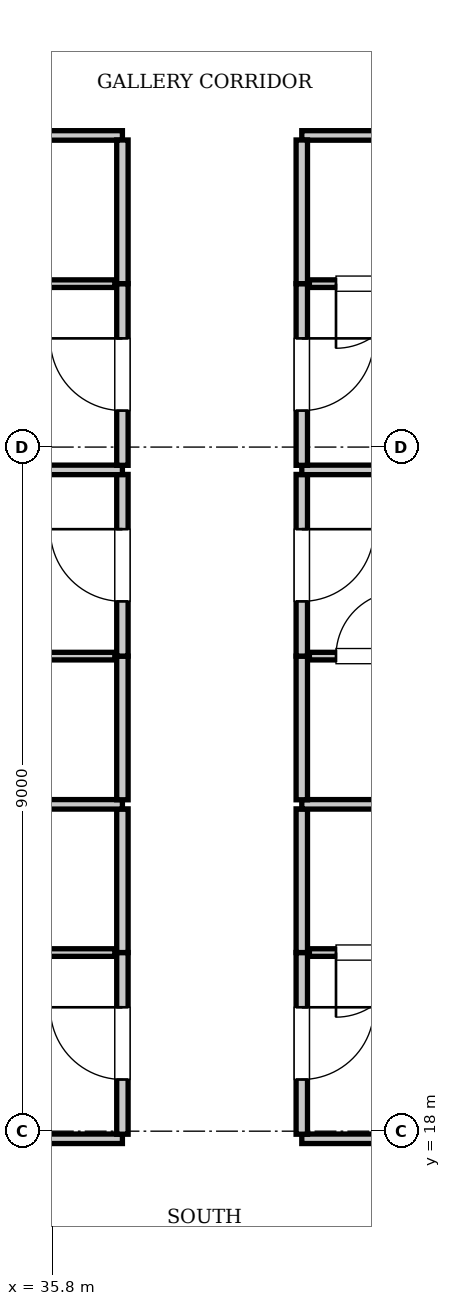
"""IFC4 building model, lengths in metres.
Left out: names, types, materials, properties, quantities, classifications, styles, units other than length and angle.
Written with IfcOpenShell. Run it as: python <this file> out.ifc"""

import sys

from ifc_helpers import new_model, si_unit, direction, frame, frame_2d, origin, place, context, subcontext, project, spatial, rectangle, extrude, element, fill, save


model = new_model("IFC4")
c1 = context("Model", 3, precision=1e-05, world=origin(), true_north=direction((0.0, 1.0)))
c2 = subcontext(c1, "Body", "Model", "MODEL_VIEW")
j1 = project(units=[si_unit("LENGTHUNIT", "METRE"), si_unit("PLANEANGLEUNIT", "RADIAN")], contexts=[c1])
p1 = place(None, origin())
s1 = spatial("IfcSite", under=j1, at=p1, CompositionType="ELEMENT")
p2 = place(p1, origin())
s2 = spatial("IfcBuilding", under=s1, at=p2, CompositionType="ELEMENT")
p3 = place(p2, frame((0.0, 0.0, 215.95)))
s3 = spatial("IfcBuildingStorey", under=s2, at=p3, CompositionType="ELEMENT", Elevation=215.95)
p4 = place(p3, frame((13.2, 17.9, 0.0), z_axis=(0.0, 0.0, 1.0), x_axis=(1.0, 0.0, 0.0)))
e1 = element("IfcWall", 1, at=p4, inside=s3, PredefinedType="PARTITIONING", context=c2, shape_type="SweptSolid", body=[
    extrude(rectangle(XDim=23.52, YDim=0.125, at=frame_2d((11.76, 0.0))), origin(), (0.0, 0.0, 1.0), 3.071),
])
p5 = place(p3, frame((39.08, 17.9, 0.0), z_axis=(0.0, 0.0, 1.0), x_axis=(1.0, 0.0, 0.0)))
e2 = element("IfcWall", 2, at=p5, inside=s3, PredefinedType="PARTITIONING", context=c2, shape_type="SweptSolid", body=[
    extrude(rectangle(XDim=23.32, YDim=0.125, at=frame_2d((11.66, 0.0))), origin(), (0.0, 0.0, 1.0), 3.071),
])
p6 = place(p3, frame((13.2, 31.1, 0.0), z_axis=(0.0, 0.0, 1.0), x_axis=(1.0, 0.0, 0.0)))
e3 = element("IfcWall", 3, at=p6, inside=s3, PredefinedType="PARTITIONING", context=c2, shape_type="SweptSolid", body=[
    extrude(rectangle(XDim=23.52, YDim=0.125, at=frame_2d((11.76, 0.0))), origin(), (0.0, 0.0, 1.0), 3.61),
])
p7 = place(p3, frame((39.08, 31.1, 0.0), z_axis=(0.0, 0.0, 1.0), x_axis=(1.0, 0.0, 0.0)))
e4 = element("IfcWall", 4, at=p7, inside=s3, PredefinedType="PARTITIONING", context=c2, shape_type="SweptSolid", body=[
    extrude(rectangle(XDim=23.32, YDim=0.125, at=frame_2d((11.66, 0.0))), origin(), (0.0, 0.0, 1.0), 3.61),
])
p8 = place(p3, frame((36.72, 17.96, 0.0), z_axis=(0.0, 0.0, 1.0), x_axis=(0.0, 1.0, 0.0)))
e5 = element("IfcWall", 5, at=p8, inside=s3, PredefinedType="PARTITIONING", context=c2, shape_type="SweptSolid", body=[
    extrude(rectangle(XDim=2.39, YDim=0.15, at=frame_2d((1.195, 0.0))), origin(), (0.0, 0.0, 1.0), 3.61),
])
p9 = place(p8, frame((0.72, 0.0, 0.0)))
e6 = element("IfcOpeningElement", 6, at=p9, cuts=e5, PredefinedType="OPENING", context=c2, shape_type="SweptSolid", body=[
    extrude(rectangle(XDim=0.95, YDim=2.15, at=frame_2d((0.475, 1.075))), frame((0.0, 0.085, 0.0), z_axis=(0.0, -1.0, 0.0), x_axis=(1.0, 0.0, 0.0)), (0.0, 0.0, 1.0), 0.17),
])
p10 = place(p3, frame((36.72, 20.35, 0.0), z_axis=(0.0, 0.0, 1.0), x_axis=(0.0, 1.0, 0.0)))
e7 = element("IfcWall", 7, at=p10, inside=s3, PredefinedType="PARTITIONING", context=c2, shape_type="SweptSolid", body=[
    extrude(rectangle(XDim=1.89, YDim=0.15, at=frame_2d((0.945, 0.0))), origin(), (0.0, 0.0, 1.0), 3.61),
])
p11 = place(p3, frame((34.32, 20.35, 0.0), z_axis=(0.0, 0.0, 1.0), x_axis=(1.0, 0.0, 0.0)))
e8 = element("IfcWall", 8, at=p11, inside=s3, PredefinedType="PARTITIONING", context=c2, shape_type="SweptSolid", body=[
    extrude(rectangle(XDim=2.3, YDim=0.1, at=frame_2d((1.15, 0.0))), origin(), (0.0, 0.0, 1.0), 3.61),
])
p12 = place(p11, frame((0.35, 0.0, 0.0)))
e9 = element("IfcOpeningElement", 9, at=p12, cuts=e8, PredefinedType="OPENING", context=c2, shape_type="SweptSolid", body=[
    extrude(rectangle(XDim=0.85, YDim=2.1, at=frame_2d((0.425, 1.05))), frame((0.0, 0.06, 0.0), z_axis=(0.0, -1.0, 0.0), x_axis=(1.0, 0.0, 0.0)), (0.0, 0.0, 1.0), 0.12),
])
p13 = place(p3, frame((39.08, 17.96, 0.0), z_axis=(0.0, 0.0, 1.0), x_axis=(0.0, 1.0, 0.0)))
e10 = element("IfcWall", 10, at=p13, inside=s3, PredefinedType="PARTITIONING", context=c2, shape_type="SweptSolid", body=[
    extrude(rectangle(XDim=2.39, YDim=0.15, at=frame_2d((1.195, 0.0))), origin(), (0.0, 0.0, 1.0), 3.61),
])
p14 = place(p13, frame((0.72, 0.0, 0.0)))
e11 = element("IfcOpeningElement", 11, at=p14, cuts=e10, PredefinedType="OPENING", context=c2, shape_type="SweptSolid", body=[
    extrude(rectangle(XDim=0.95, YDim=2.15, at=frame_2d((0.475, 1.075))), frame((0.0, 0.085, 0.0), z_axis=(0.0, -1.0, 0.0), x_axis=(1.0, 0.0, 0.0)), (0.0, 0.0, 1.0), 0.17),
])
p15 = place(p3, frame((39.08, 20.35, 0.0), z_axis=(0.0, 0.0, 1.0), x_axis=(0.0, 1.0, 0.0)))
e12 = element("IfcWall", 12, at=p15, inside=s3, PredefinedType="PARTITIONING", context=c2, shape_type="SweptSolid", body=[
    extrude(rectangle(XDim=1.89, YDim=0.15, at=frame_2d((0.945, 0.0))), origin(), (0.0, 0.0, 1.0), 3.61),
])
p16 = place(p3, frame((39.18, 20.35, 0.0), z_axis=(0.0, 0.0, 1.0), x_axis=(1.0, 0.0, 0.0)))
e13 = element("IfcWall", 13, at=p16, inside=s3, PredefinedType="PARTITIONING", context=c2, shape_type="SweptSolid", body=[
    extrude(rectangle(XDim=2.3, YDim=0.1, at=frame_2d((1.15, 0.0))), origin(), (0.0, 0.0, 1.0), 3.61),
])
p17 = place(p16, frame((0.35, 0.0, 0.0)))
e14 = element("IfcOpeningElement", 14, at=p17, cuts=e13, PredefinedType="OPENING", context=c2, shape_type="SweptSolid", body=[
    extrude(rectangle(XDim=0.85, YDim=2.1, at=frame_2d((0.425, 1.05))), frame((0.0, 0.06, 0.0), z_axis=(0.0, -1.0, 0.0), x_axis=(1.0, 0.0, 0.0)), (0.0, 0.0, 1.0), 0.12),
])
p18 = place(p3, frame((13.2, 22.3, 0.0), z_axis=(0.0, 0.0, 1.0), x_axis=(1.0, 0.0, 0.0)))
e15 = element("IfcWall", 15, at=p18, inside=s3, PredefinedType="PARTITIONING", context=c2, shape_type="SweptSolid", body=[
    extrude(rectangle(XDim=23.52, YDim=0.125, at=frame_2d((11.76, 0.0))), origin(), (0.0, 0.0, 1.0), 3.61),
])
p19 = place(p3, frame((39.08, 22.3, 0.0), z_axis=(0.0, 0.0, 1.0), x_axis=(1.0, 0.0, 0.0)))
e16 = element("IfcWall", 16, at=p19, inside=s3, PredefinedType="PARTITIONING", context=c2, shape_type="SweptSolid", body=[
    extrude(rectangle(XDim=23.32, YDim=0.125, at=frame_2d((11.66, 0.0))), origin(), (0.0, 0.0, 1.0), 3.61),
])
p20 = place(p3, frame((36.72, 22.36, 0.0), z_axis=(0.0, 0.0, 1.0), x_axis=(0.0, 1.0, 0.0)))
e17 = element("IfcWall", 17, at=p20, inside=s3, PredefinedType="PARTITIONING", context=c2, shape_type="SweptSolid", body=[
    extrude(rectangle(XDim=1.89, YDim=0.15, at=frame_2d((0.945, 0.0))), origin(), (0.0, 0.0, 1.0), 3.61),
])
p21 = place(p3, frame((36.72, 24.25, 0.0), z_axis=(0.0, 0.0, 1.0), x_axis=(0.0, 1.0, 0.0)))
e18 = element("IfcWall", 18, at=p21, inside=s3, PredefinedType="PARTITIONING", context=c2, shape_type="SweptSolid", body=[
    extrude(rectangle(XDim=2.39, YDim=0.15, at=frame_2d((1.195, 0.0))), origin(), (0.0, 0.0, 1.0), 3.61),
])
p22 = place(p21, frame((0.72, 0.0, 0.0)))
e19 = element("IfcOpeningElement", 19, at=p22, cuts=e18, PredefinedType="OPENING", context=c2, shape_type="SweptSolid", body=[
    extrude(rectangle(XDim=0.95, YDim=2.15, at=frame_2d((0.475, 1.075))), frame((0.0, 0.085, 0.0), z_axis=(0.0, -1.0, 0.0), x_axis=(1.0, 0.0, 0.0)), (0.0, 0.0, 1.0), 0.17),
])
p23 = place(p3, frame((34.32, 24.25, 0.0), z_axis=(0.0, 0.0, 1.0), x_axis=(1.0, 0.0, 0.0)))
e20 = element("IfcWall", 20, at=p23, inside=s3, PredefinedType="PARTITIONING", context=c2, shape_type="SweptSolid", body=[
    extrude(rectangle(XDim=2.3, YDim=0.1, at=frame_2d((1.15, 0.0))), origin(), (0.0, 0.0, 1.0), 3.61),
])
p24 = place(p23, frame((0.35, 0.0, 0.0)))
e21 = element("IfcOpeningElement", 21, at=p24, cuts=e20, PredefinedType="OPENING", context=c2, shape_type="SweptSolid", body=[
    extrude(rectangle(XDim=0.85, YDim=2.1, at=frame_2d((0.425, 1.05))), frame((0.0, 0.06, 0.0), z_axis=(0.0, -1.0, 0.0), x_axis=(1.0, 0.0, 0.0)), (0.0, 0.0, 1.0), 0.12),
])
p25 = place(p3, frame((39.08, 22.36, 0.0), z_axis=(0.0, 0.0, 1.0), x_axis=(0.0, 1.0, 0.0)))
e22 = element("IfcWall", 22, at=p25, inside=s3, PredefinedType="PARTITIONING", context=c2, shape_type="SweptSolid", body=[
    extrude(rectangle(XDim=1.89, YDim=0.15, at=frame_2d((0.945, 0.0))), origin(), (0.0, 0.0, 1.0), 3.61),
])
p26 = place(p3, frame((39.08, 24.25, 0.0), z_axis=(0.0, 0.0, 1.0), x_axis=(0.0, 1.0, 0.0)))
e23 = element("IfcWall", 23, at=p26, inside=s3, PredefinedType="PARTITIONING", context=c2, shape_type="SweptSolid", body=[
    extrude(rectangle(XDim=2.39, YDim=0.15, at=frame_2d((1.195, 0.0))), origin(), (0.0, 0.0, 1.0), 3.61),
])
p27 = place(p26, frame((0.72, 0.0, 0.0)))
e24 = element("IfcOpeningElement", 24, at=p27, cuts=e23, PredefinedType="OPENING", context=c2, shape_type="SweptSolid", body=[
    extrude(rectangle(XDim=0.95, YDim=2.15, at=frame_2d((0.475, 1.075))), frame((0.0, 0.085, 0.0), z_axis=(0.0, -1.0, 0.0), x_axis=(1.0, 0.0, 0.0)), (0.0, 0.0, 1.0), 0.17),
])
p28 = place(p3, frame((39.18, 24.25, 0.0), z_axis=(0.0, 0.0, 1.0), x_axis=(1.0, 0.0, 0.0)))
e25 = element("IfcWall", 25, at=p28, inside=s3, PredefinedType="PARTITIONING", context=c2, shape_type="SweptSolid", body=[
    extrude(rectangle(XDim=2.3, YDim=0.1, at=frame_2d((1.15, 0.0))), origin(), (0.0, 0.0, 1.0), 3.61),
])
p29 = place(p28, frame((0.35, 0.0, 0.0)))
e26 = element("IfcOpeningElement", 26, at=p29, cuts=e25, PredefinedType="OPENING", context=c2, shape_type="SweptSolid", body=[
    extrude(rectangle(XDim=0.85, YDim=2.1, at=frame_2d((0.425, 1.05))), frame((0.0, 0.06, 0.0), z_axis=(0.0, -1.0, 0.0), x_axis=(1.0, 0.0, 0.0)), (0.0, 0.0, 1.0), 0.12),
])
p30 = place(p3, frame((13.2, 26.7, 0.0), z_axis=(0.0, 0.0, 1.0), x_axis=(1.0, 0.0, 0.0)))
e27 = element("IfcWall", 27, at=p30, inside=s3, PredefinedType="PARTITIONING", context=c2, shape_type="SweptSolid", body=[
    extrude(rectangle(XDim=23.52, YDim=0.125, at=frame_2d((11.76, 0.0))), origin(), (0.0, 0.0, 1.0), 3.61),
])
p31 = place(p3, frame((39.08, 26.7, 0.0), z_axis=(0.0, 0.0, 1.0), x_axis=(1.0, 0.0, 0.0)))
e28 = element("IfcWall", 28, at=p31, inside=s3, PredefinedType="PARTITIONING", context=c2, shape_type="SweptSolid", body=[
    extrude(rectangle(XDim=23.32, YDim=0.125, at=frame_2d((11.66, 0.0))), origin(), (0.0, 0.0, 1.0), 3.61),
])
p32 = place(p3, frame((36.72, 26.76, 0.0), z_axis=(0.0, 0.0, 1.0), x_axis=(0.0, 1.0, 0.0)))
e29 = element("IfcWall", 29, at=p32, inside=s3, PredefinedType="PARTITIONING", context=c2, shape_type="SweptSolid", body=[
    extrude(rectangle(XDim=2.39, YDim=0.15, at=frame_2d((1.195, 0.0))), origin(), (0.0, 0.0, 1.0), 3.61),
])
p33 = place(p32, frame((0.72, 0.0, 0.0)))
e30 = element("IfcOpeningElement", 30, at=p33, cuts=e29, PredefinedType="OPENING", context=c2, shape_type="SweptSolid", body=[
    extrude(rectangle(XDim=0.95, YDim=2.15, at=frame_2d((0.475, 1.075))), frame((0.0, 0.085, 0.0), z_axis=(0.0, -1.0, 0.0), x_axis=(1.0, 0.0, 0.0)), (0.0, 0.0, 1.0), 0.17),
])
p34 = place(p3, frame((36.72, 29.15, 0.0), z_axis=(0.0, 0.0, 1.0), x_axis=(0.0, 1.0, 0.0)))
e31 = element("IfcWall", 31, at=p34, inside=s3, PredefinedType="PARTITIONING", context=c2, shape_type="SweptSolid", body=[
    extrude(rectangle(XDim=1.89, YDim=0.15, at=frame_2d((0.945, 0.0))), origin(), (0.0, 0.0, 1.0), 3.61),
])
p35 = place(p3, frame((34.32, 29.15, 0.0), z_axis=(0.0, 0.0, 1.0), x_axis=(1.0, 0.0, 0.0)))
e32 = element("IfcWall", 32, at=p35, inside=s3, PredefinedType="PARTITIONING", context=c2, shape_type="SweptSolid", body=[
    extrude(rectangle(XDim=2.3, YDim=0.1, at=frame_2d((1.15, 0.0))), origin(), (0.0, 0.0, 1.0), 3.61),
])
p36 = place(p35, frame((0.35, 0.0, 0.0)))
e33 = element("IfcOpeningElement", 33, at=p36, cuts=e32, PredefinedType="OPENING", context=c2, shape_type="SweptSolid", body=[
    extrude(rectangle(XDim=0.85, YDim=2.1, at=frame_2d((0.425, 1.05))), frame((0.0, 0.06, 0.0), z_axis=(0.0, -1.0, 0.0), x_axis=(1.0, 0.0, 0.0)), (0.0, 0.0, 1.0), 0.12),
])
p37 = place(p3, frame((39.08, 26.76, 0.0), z_axis=(0.0, 0.0, 1.0), x_axis=(0.0, 1.0, 0.0)))
e34 = element("IfcWall", 34, at=p37, inside=s3, PredefinedType="PARTITIONING", context=c2, shape_type="SweptSolid", body=[
    extrude(rectangle(XDim=2.39, YDim=0.15, at=frame_2d((1.195, 0.0))), origin(), (0.0, 0.0, 1.0), 3.61),
])
p38 = place(p37, frame((0.72, 0.0, 0.0)))
e35 = element("IfcOpeningElement", 35, at=p38, cuts=e34, PredefinedType="OPENING", context=c2, shape_type="SweptSolid", body=[
    extrude(rectangle(XDim=0.95, YDim=2.15, at=frame_2d((0.475, 1.075))), frame((0.0, 0.085, 0.0), z_axis=(0.0, -1.0, 0.0), x_axis=(1.0, 0.0, 0.0)), (0.0, 0.0, 1.0), 0.17),
])
p39 = place(p3, frame((39.08, 29.15, 0.0), z_axis=(0.0, 0.0, 1.0), x_axis=(0.0, 1.0, 0.0)))
e36 = element("IfcWall", 36, at=p39, inside=s3, PredefinedType="PARTITIONING", context=c2, shape_type="SweptSolid", body=[
    extrude(rectangle(XDim=1.89, YDim=0.15, at=frame_2d((0.945, 0.0))), origin(), (0.0, 0.0, 1.0), 3.61),
])
p40 = place(p3, frame((39.18, 29.15, 0.0), z_axis=(0.0, 0.0, 1.0), x_axis=(1.0, 0.0, 0.0)))
e37 = element("IfcWall", 37, at=p40, inside=s3, PredefinedType="PARTITIONING", context=c2, shape_type="SweptSolid", body=[
    extrude(rectangle(XDim=2.3, YDim=0.1, at=frame_2d((1.15, 0.0))), origin(), (0.0, 0.0, 1.0), 3.61),
])
p41 = place(p40, frame((0.35, 0.0, 0.0)))
e38 = element("IfcOpeningElement", 38, at=p41, cuts=e37, PredefinedType="OPENING", context=c2, shape_type="SweptSolid", body=[
    extrude(rectangle(XDim=0.85, YDim=2.1, at=frame_2d((0.425, 1.05))), frame((0.0, 0.06, 0.0), z_axis=(0.0, -1.0, 0.0), x_axis=(1.0, 0.0, 0.0)), (0.0, 0.0, 1.0), 0.12),
])
p42 = place(p9, origin())
e39 = element("IfcDoor", 39, at=p42, inside=s3, OperationType="SINGLE_SWING_RIGHT", PredefinedType="DOOR", context=c2, shape_type="SweptSolid", body=[
    extrude(rectangle(XDim=0.95, YDim=2.15, at=frame_2d((0.475, 1.075))), frame((0.0, 0.025, 0.0), z_axis=(0.0, -1.0, 0.0), x_axis=(1.0, 0.0, 0.0)), (0.0, 0.0, 1.0), 0.05),
])
fill(e6, e39)
p43 = place(p17, frame((0.85, 0.0, 0.0), z_axis=(0.0, 0.0, 1.0), x_axis=(-1.0, 0.0, 0.0)))
e40 = element("IfcDoor", 40, at=p43, inside=s3, OperationType="SINGLE_SWING_RIGHT", PredefinedType="DOOR", context=c2, shape_type="SweptSolid", body=[
    extrude(rectangle(XDim=0.85, YDim=2.1, at=frame_2d((0.425, 1.05))), frame((0.0, 0.025, 0.0), z_axis=(0.0, -1.0, 0.0), x_axis=(1.0, 0.0, 0.0)), (0.0, 0.0, 1.0), 0.05),
])
fill(e14, e40)
p44 = place(p14, frame((0.95, 0.0, 0.0), z_axis=(0.0, 0.0, 1.0), x_axis=(-1.0, 0.0, 0.0)))
e41 = element("IfcDoor", 41, at=p44, inside=s3, OperationType="SINGLE_SWING_LEFT", PredefinedType="DOOR", context=c2, shape_type="SweptSolid", body=[
    extrude(rectangle(XDim=0.95, YDim=2.15, at=frame_2d((0.475, 1.075))), frame((0.0, 0.025, 0.0), z_axis=(0.0, -1.0, 0.0), x_axis=(1.0, 0.0, 0.0)), (0.0, 0.0, 1.0), 0.05),
])
fill(e11, e41)
p45 = place(p22, origin())
e42 = element("IfcDoor", 42, at=p45, inside=s3, OperationType="SINGLE_SWING_RIGHT", PredefinedType="DOOR", context=c2, shape_type="SweptSolid", body=[
    extrude(rectangle(XDim=0.95, YDim=2.15, at=frame_2d((0.475, 1.075))), frame((0.0, 0.025, 0.0), z_axis=(0.0, -1.0, 0.0), x_axis=(1.0, 0.0, 0.0)), (0.0, 0.0, 1.0), 0.05),
])
fill(e19, e42)
p46 = place(p29, origin())
e43 = element("IfcDoor", 43, at=p46, inside=s3, OperationType="SINGLE_SWING_RIGHT", PredefinedType="DOOR", context=c2, shape_type="SweptSolid", body=[
    extrude(rectangle(XDim=0.85, YDim=2.1, at=frame_2d((0.425, 1.05))), frame((0.0, 0.025, 0.0), z_axis=(0.0, -1.0, 0.0), x_axis=(1.0, 0.0, 0.0)), (0.0, 0.0, 1.0), 0.05),
])
fill(e26, e43)
p47 = place(p27, frame((0.95, 0.0, 0.0), z_axis=(0.0, 0.0, 1.0), x_axis=(-1.0, 0.0, 0.0)))
e44 = element("IfcDoor", 44, at=p47, inside=s3, OperationType="SINGLE_SWING_LEFT", PredefinedType="DOOR", context=c2, shape_type="SweptSolid", body=[
    extrude(rectangle(XDim=0.95, YDim=2.15, at=frame_2d((0.475, 1.075))), frame((0.0, 0.025, 0.0), z_axis=(0.0, -1.0, 0.0), x_axis=(1.0, 0.0, 0.0)), (0.0, 0.0, 1.0), 0.05),
])
fill(e24, e44)
p48 = place(p33, origin())
e45 = element("IfcDoor", 45, at=p48, inside=s3, OperationType="SINGLE_SWING_RIGHT", PredefinedType="DOOR", context=c2, shape_type="SweptSolid", body=[
    extrude(rectangle(XDim=0.95, YDim=2.15, at=frame_2d((0.475, 1.075))), frame((0.0, 0.025, 0.0), z_axis=(0.0, -1.0, 0.0), x_axis=(1.0, 0.0, 0.0)), (0.0, 0.0, 1.0), 0.05),
])
fill(e30, e45)
p49 = place(p41, frame((0.85, 0.0, 0.0), z_axis=(0.0, 0.0, 1.0), x_axis=(-1.0, 0.0, 0.0)))
e46 = element("IfcDoor", 46, at=p49, inside=s3, OperationType="SINGLE_SWING_RIGHT", PredefinedType="DOOR", context=c2, shape_type="SweptSolid", body=[
    extrude(rectangle(XDim=0.85, YDim=2.1, at=frame_2d((0.425, 1.05))), frame((0.0, 0.025, 0.0), z_axis=(0.0, -1.0, 0.0), x_axis=(1.0, 0.0, 0.0)), (0.0, 0.0, 1.0), 0.05),
])
fill(e38, e46)
p50 = place(p38, frame((0.95, 0.0, 0.0), z_axis=(0.0, 0.0, 1.0), x_axis=(-1.0, 0.0, 0.0)))
e47 = element("IfcDoor", 47, at=p50, inside=s3, OperationType="SINGLE_SWING_LEFT", PredefinedType="DOOR", context=c2, shape_type="SweptSolid", body=[
    extrude(rectangle(XDim=0.95, YDim=2.15, at=frame_2d((0.475, 1.075))), frame((0.0, 0.025, 0.0), z_axis=(0.0, -1.0, 0.0), x_axis=(1.0, 0.0, 0.0)), (0.0, 0.0, 1.0), 0.05),
])
fill(e35, e47)
save(model, sys.argv[1])
